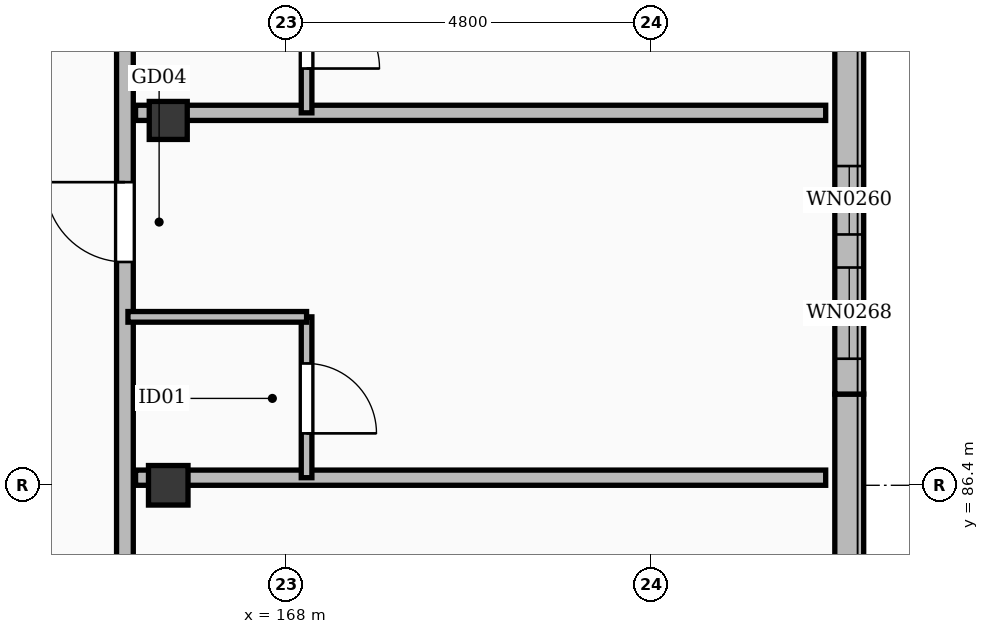
"""IFC4 building model, lengths in metres.
Left out: names, types, materials, properties, quantities, classifications, styles, units other than length and angle.
Written with IfcOpenShell. Run it as: python <this file> out.ifc"""

import sys

from ifc_helpers import new_model, si_unit, direction, frame, frame_2d, origin, origin_2d, place, context, subcontext, project, spatial, rectangle, extrude, element, fill, save


model = new_model("IFC4")
c1 = context("Model", 3, precision=1e-05, world=origin(), true_north=direction((0.0, 1.0)))
c2 = subcontext(c1, "Body", "Model", "MODEL_VIEW")
j1 = project(units=[si_unit("LENGTHUNIT", "METRE"), si_unit("PLANEANGLEUNIT", "RADIAN")], contexts=[c1])
p1 = place(None, origin())
s1 = spatial("IfcSite", under=j1, at=p1, CompositionType="ELEMENT")
p2 = place(p1, origin())
s2 = spatial("IfcBuilding", under=s1, at=p2, CompositionType="ELEMENT")
p3 = place(p2, frame((0.0, 0.0, 50.4)))
s3 = spatial("IfcBuildingStorey", under=s2, at=p3, CompositionType="ELEMENT", Elevation=50.4)
p4 = place(p3, frame((166.45, 86.4, 0.0), z_axis=(0.0, 0.0, 1.0), x_axis=(1.0, 0.0, 0.0)))
e1 = element("IfcColumn", 1, at=p4, inside=s3, PredefinedType="COLUMN", context=c2, shape_type="SweptSolid", body=[
    extrude(rectangle(XDim=0.52, YDim=0.52, at=origin_2d()), origin(), (0.0, 0.0, 1.0), 4.2),
])
p5 = place(p3, frame((166.45, 91.2, 0.0), z_axis=(0.0, 0.0, 1.0), x_axis=(1.0, 0.0, 0.0)))
e2 = element("IfcColumn", 2, at=p5, inside=s3, PredefinedType="COLUMN", context=c2, shape_type="SweptSolid", body=[
    extrude(rectangle(XDim=0.5, YDim=0.5, at=origin_2d()), origin(), (0.0, 0.0, 1.0), 4.2),
])
p6 = place(p3, frame((175.41, 87.6, 0.0), z_axis=(0.0, 0.0, 1.0), x_axis=(0.0, -1.0, 0.0)))
e3 = element("IfcWall", 3, at=p6, inside=s3, PredefinedType="SOLIDWALL", context=c2, shape_type="SweptSolid", body=[
    extrude(rectangle(XDim=4.8, YDim=0.38, at=frame_2d((2.4, 0.0))), origin(), (0.0, 0.0, 1.0), 3.96),
])
p7 = place(p3, frame((175.41, 92.4, 0.0), z_axis=(0.0, 0.0, 1.0), x_axis=(0.0, -1.0, 0.0)))
e4 = element("IfcWall", 4, at=p7, inside=s3, PredefinedType="SOLIDWALL", context=c2, shape_type="SweptSolid", body=[
    extrude(rectangle(XDim=4.8, YDim=0.38, at=frame_2d((2.4, 0.0))), origin(), (0.0, 0.0, 1.0), 3.96),
])
p8 = place(p7, frame((1.8, 0.0, 0.35)))
e5 = element("IfcOpeningElement", 5, at=p8, cuts=e4, PredefinedType="OPENING", context=c2, shape_type="SweptSolid", body=[
    extrude(rectangle(XDim=0.9, YDim=1.68, at=frame_2d((0.45, 0.84))), frame((0.0, 0.202, 0.0), z_axis=(0.0, -1.0, 0.0), x_axis=(1.0, 0.0, 0.0)), (0.0, 0.0, 1.0), 0.404),
])
p9 = place(p7, frame((3.135, 0.0, 0.55)))
e6 = element("IfcOpeningElement", 6, at=p9, cuts=e4, PredefinedType="OPENING", context=c2, shape_type="SweptSolid", body=[
    extrude(rectangle(XDim=1.2, YDim=1.72, at=frame_2d((0.6, 0.86))), frame((0.0, 0.202, 0.0), z_axis=(0.0, -1.0, 0.0), x_axis=(1.0, 0.0, 0.0)), (0.0, 0.0, 1.0), 0.404),
])
p10 = place(p3, frame((165.88, 73.55, 0.0), z_axis=(0.0, 0.0, 1.0), x_axis=(0.0, 1.0, 0.0)))
e7 = element("IfcWall", 7, at=p10, inside=s3, PredefinedType="PARTITIONING", context=c2, shape_type="SweptSolid", body=[
    extrude(rectangle(XDim=52.1, YDim=0.22, at=frame_2d((26.05, 0.0))), origin(), (0.0, 0.0, 1.0), 3.202),
])
p11 = place(p10, frame((5.9, 0.0, 0.0)))
e8 = element("IfcOpeningElement", 8, at=p11, cuts=e7, PredefinedType="OPENING", context=c2, shape_type="SweptSolid", body=[
    extrude(rectangle(XDim=1.12, YDim=2.15, at=frame_2d((0.56, 1.075))), frame((0.0, 0.122, 0.0), z_axis=(0.0, -1.0, 0.0), x_axis=(1.0, 0.0, 0.0)), (0.0, 0.0, 1.0), 0.244),
])
p12 = place(p10, frame((15.788, 0.0, 0.0)))
e9 = element("IfcOpeningElement", 9, at=p12, cuts=e7, PredefinedType="OPENING", context=c2, shape_type="SweptSolid", body=[
    extrude(rectangle(XDim=1.05, YDim=2.22, at=frame_2d((0.525, 1.11))), frame((0.0, 0.122, 0.0), z_axis=(0.0, -1.0, 0.0), x_axis=(1.0, 0.0, 0.0)), (0.0, 0.0, 1.0), 0.244),
])
p13 = place(p10, frame((20.588, 0.0, 0.0)))
e10 = element("IfcOpeningElement", 10, at=p13, cuts=e7, PredefinedType="OPENING", context=c2, shape_type="SweptSolid", body=[
    extrude(rectangle(XDim=1.02, YDim=2.2, at=frame_2d((0.51, 1.1))), frame((0.0, 0.122, 0.0), z_axis=(0.0, -1.0, 0.0), x_axis=(1.0, 0.0, 0.0)), (0.0, 0.0, 1.0), 0.244),
])
p14 = place(p10, frame((25.388, 0.0, 0.0)))
e11 = element("IfcOpeningElement", 11, at=p14, cuts=e7, PredefinedType="OPENING", context=c2, shape_type="SweptSolid", body=[
    extrude(rectangle(XDim=1.14, YDim=2.26, at=frame_2d((0.57, 1.13))), frame((0.0, 0.122, 0.0), z_axis=(0.0, -1.0, 0.0), x_axis=(1.0, 0.0, 0.0)), (0.0, 0.0, 1.0), 0.244),
])
p15 = place(p10, frame((30.188, 0.0, 0.0)))
e12 = element("IfcOpeningElement", 12, at=p15, cuts=e7, PredefinedType="OPENING", context=c2, shape_type="SweptSolid", body=[
    extrude(rectangle(XDim=0.98, YDim=2.15, at=frame_2d((0.49, 1.075))), frame((0.0, 0.122, 0.0), z_axis=(0.0, -1.0, 0.0), x_axis=(1.0, 0.0, 0.0)), (0.0, 0.0, 1.0), 0.244),
])
p16 = place(p10, frame((34.988, 0.0, 0.0)))
e13 = element("IfcOpeningElement", 13, at=p16, cuts=e7, PredefinedType="OPENING", context=c2, shape_type="SweptSolid", body=[
    extrude(rectangle(XDim=1.28, YDim=2.16, at=frame_2d((0.64, 1.08))), frame((0.0, 0.122, 0.0), z_axis=(0.0, -1.0, 0.0), x_axis=(1.0, 0.0, 0.0)), (0.0, 0.0, 1.0), 0.244),
])
p17 = place(p10, frame((39.788, 0.0, 0.0)))
e14 = element("IfcOpeningElement", 14, at=p17, cuts=e7, PredefinedType="OPENING", context=c2, shape_type="SweptSolid", body=[
    extrude(rectangle(XDim=0.9, YDim=2.08, at=frame_2d((0.45, 1.04))), frame((0.0, 0.122, 0.0), z_axis=(0.0, -1.0, 0.0), x_axis=(1.0, 0.0, 0.0)), (0.0, 0.0, 1.0), 0.244),
])
p18 = place(p10, frame((44.588, 0.0, 0.0)))
e15 = element("IfcOpeningElement", 15, at=p18, cuts=e7, PredefinedType="OPENING", context=c2, shape_type="SweptSolid", body=[
    extrude(rectangle(XDim=1.05, YDim=2.22, at=frame_2d((0.525, 1.11))), frame((0.0, 0.122, 0.0), z_axis=(0.0, -1.0, 0.0), x_axis=(1.0, 0.0, 0.0)), (0.0, 0.0, 1.0), 0.244),
])
p19 = place(p10, frame((49.388, 0.0, 0.0)))
e16 = element("IfcOpeningElement", 16, at=p19, cuts=e7, PredefinedType="OPENING", context=c2, shape_type="SweptSolid", body=[
    extrude(rectangle(XDim=1.02, YDim=2.2, at=frame_2d((0.51, 1.1))), frame((0.0, 0.122, 0.0), z_axis=(0.0, -1.0, 0.0), x_axis=(1.0, 0.0, 0.0)), (0.0, 0.0, 1.0), 0.244),
])
p20 = place(p3, frame((166.02, 86.5, 0.0), z_axis=(0.0, 0.0, 1.0), x_axis=(1.0, 0.0, 0.0)))
e17 = element("IfcWall", 17, at=p20, inside=s3, PredefinedType="PARTITIONING", context=c2, shape_type="SweptSolid", body=[
    extrude(rectangle(XDim=9.08, YDim=0.2, at=frame_2d((4.54, 0.0))), origin(), (0.0, 0.0, 1.0), 3.352),
])
p21 = place(p3, frame((168.27, 86.5, 0.0), z_axis=(0.0, 0.0, 1.0), x_axis=(0.0, 1.0, 0.0)))
e18 = element("IfcWall", 18, at=p21, inside=s3, PredefinedType="PARTITIONING", context=c2, shape_type="SweptSolid", body=[
    extrude(rectangle(XDim=2.116, YDim=0.14, at=frame_2d((1.058, 0.0))), origin(), (0.0, 0.0, 1.0), 3.96),
])
p22 = place(p21, frame((0.583, 0.0, 0.0)))
e19 = element("IfcOpeningElement", 19, at=p22, cuts=e18, PredefinedType="OPENING", context=c2, shape_type="SweptSolid", body=[
    extrude(rectangle(XDim=0.92, YDim=2.1, at=frame_2d((0.46, 1.05))), frame((0.0, 0.082, 0.0), z_axis=(0.0, -1.0, 0.0), x_axis=(1.0, 0.0, 0.0)), (0.0, 0.0, 1.0), 0.164),
])
p23 = place(p3, frame((165.92, 88.616, 0.0), z_axis=(0.0, 0.0, 1.0), x_axis=(1.0, 0.0, 0.0)))
e20 = element("IfcWall", 20, at=p23, inside=s3, PredefinedType="PARTITIONING", context=c2, shape_type="SweptSolid", body=[
    extrude(rectangle(XDim=2.35, YDim=0.14, at=frame_2d((1.175, 0.0))), origin(), (0.0, 0.0, 1.0), 3.352),
])
p24 = place(p3, frame((166.02, 91.3, 0.0), z_axis=(0.0, 0.0, 1.0), x_axis=(1.0, 0.0, 0.0)))
e21 = element("IfcWall", 21, at=p24, inside=s3, PredefinedType="PARTITIONING", context=c2, shape_type="SweptSolid", body=[
    extrude(rectangle(XDim=9.08, YDim=0.2, at=frame_2d((4.54, 0.0))), origin(), (0.0, 0.0, 1.0), 3.352),
])
p25 = place(p3, frame((168.27, 91.3, 0.0), z_axis=(0.0, 0.0, 1.0), x_axis=(0.0, 1.0, 0.0)))
e22 = element("IfcWall", 22, at=p25, inside=s3, PredefinedType="PARTITIONING", context=c2, shape_type="SweptSolid", body=[
    extrude(rectangle(XDim=2.116, YDim=0.14, at=frame_2d((1.058, 0.0))), origin(), (0.0, 0.0, 1.0), 3.96),
])
p26 = place(p25, frame((0.583, 0.0, 0.0)))
e23 = element("IfcOpeningElement", 23, at=p26, cuts=e22, PredefinedType="OPENING", context=c2, shape_type="SweptSolid", body=[
    extrude(rectangle(XDim=0.96, YDim=2.12, at=frame_2d((0.48, 1.06))), frame((0.0, 0.082, 0.0), z_axis=(0.0, -1.0, 0.0), x_axis=(1.0, 0.0, 0.0)), (0.0, 0.0, 1.0), 0.164),
])
p27 = place(p8, origin())
e24 = element("IfcWindow", 24, at=p27, inside=s3, PartitioningType="SINGLE_PANEL", PredefinedType="WINDOW", context=c2, shape_type="SweptSolid", body=[
    extrude(rectangle(XDim=0.9, YDim=1.68, at=frame_2d((0.45, 0.84))), frame((0.0, 0.03, 0.0), z_axis=(0.0, -1.0, 0.0), x_axis=(1.0, 0.0, 0.0)), (0.0, 0.0, 1.0), 0.06),
])
fill(e5, e24)
p28 = place(p9, origin())
e25 = element("IfcWindow", 25, at=p28, inside=s3, PartitioningType="SINGLE_PANEL", PredefinedType="WINDOW", context=c2, shape_type="SweptSolid", body=[
    extrude(rectangle(XDim=1.2, YDim=1.72, at=frame_2d((0.6, 0.86))), frame((0.0, 0.03, 0.0), z_axis=(0.0, -1.0, 0.0), x_axis=(1.0, 0.0, 0.0)), (0.0, 0.0, 1.0), 0.06),
])
fill(e6, e25)
p29 = place(p12, origin())
e26 = element("IfcDoor", 26, at=p29, inside=s3, OperationType="SINGLE_SWING_RIGHT", PredefinedType="DOOR", context=c2, shape_type="SweptSolid", body=[
    extrude(rectangle(XDim=1.05, YDim=2.22, at=frame_2d((0.525, 1.11))), frame((0.0, 0.025, 0.0), z_axis=(0.0, -1.0, 0.0), x_axis=(1.0, 0.0, 0.0)), (0.0, 0.0, 1.0), 0.05),
])
fill(e9, e26)
p30 = place(p22, frame((0.92, 0.0, 0.0), z_axis=(0.0, 0.0, 1.0), x_axis=(-1.0, 0.0, 0.0)))
e27 = element("IfcDoor", 27, at=p30, inside=s3, OperationType="SINGLE_SWING_LEFT", PredefinedType="DOOR", context=c2, shape_type="SweptSolid", body=[
    extrude(rectangle(XDim=0.92, YDim=2.1, at=frame_2d((0.46, 1.05))), frame((0.0, 0.025, 0.0), z_axis=(0.0, -1.0, 0.0), x_axis=(1.0, 0.0, 0.0)), (0.0, 0.0, 1.0), 0.05),
])
fill(e19, e27)
p31 = place(p26, frame((0.96, 0.0, 0.0), z_axis=(0.0, 0.0, 1.0), x_axis=(-1.0, 0.0, 0.0)))
e28 = element("IfcDoor", 28, at=p31, inside=s3, OperationType="SINGLE_SWING_LEFT", PredefinedType="DOOR", context=c2, shape_type="SweptSolid", body=[
    extrude(rectangle(XDim=0.96, YDim=2.12, at=frame_2d((0.48, 1.06))), frame((0.0, 0.025, 0.0), z_axis=(0.0, -1.0, 0.0), x_axis=(1.0, 0.0, 0.0)), (0.0, 0.0, 1.0), 0.05),
])
fill(e23, e28)
save(model, sys.argv[1])
